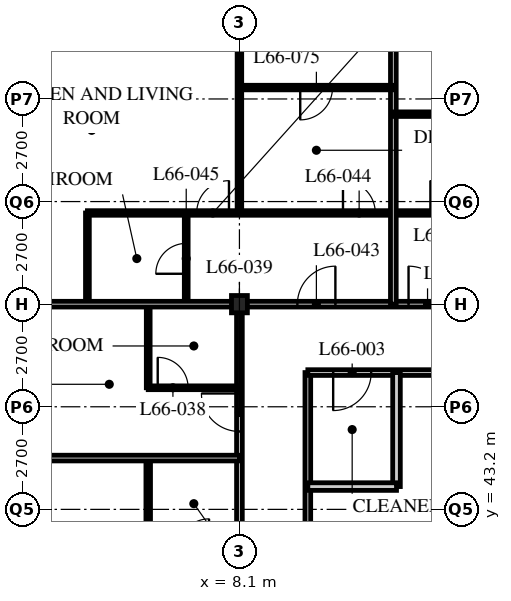
"""IFC4 building model, lengths in metres.
Left out: names, types, materials, properties, quantities, classifications, styles, units other than length and angle.
Written with IfcOpenShell. Run it as: python <this file> out.ifc"""

import sys

from ifc_helpers import new_model, si_unit, direction, frame, frame_2d, origin, origin_2d, place, context, subcontext, project, spatial, rectangle, i_section, extrude, element, fill, save


model = new_model("IFC4")
c1 = context("Model", 3, precision=1e-05, world=origin(), true_north=direction((0.0, 1.0)))
c2 = subcontext(c1, "Body", "Model", "MODEL_VIEW")
j1 = project(units=[si_unit("LENGTHUNIT", "METRE"), si_unit("PLANEANGLEUNIT", "RADIAN")], contexts=[c1])
p1 = place(None, origin())
s1 = spatial("IfcSite", under=j1, at=p1, CompositionType="ELEMENT")
p2 = place(p1, origin())
s2 = spatial("IfcBuilding", under=s1, at=p2, CompositionType="ELEMENT")
p3 = place(p2, frame((0.0, 0.0, 258.0)))
s3 = spatial("IfcBuildingStorey", under=s2, at=p3, CompositionType="ELEMENT", Elevation=258.0)
p4 = place(p3, frame((8.1, 48.6, 0.0), z_axis=(0.0, 0.0, 1.0), x_axis=(1.0, 0.0, 0.0)))
e1 = element("IfcColumn", 1, at=p4, inside=s3, PredefinedType="COLUMN", context=c2, shape_type="SweptSolid", body=[
    extrude(i_section(OverallWidth=0.418, OverallDepth=0.456, WebThickness=0.042, FlangeThickness=0.067, FilletRadius=0.015, at=origin_2d()), origin(), (0.0, 0.0, 1.0), 3.9),
])
p5 = place(p3, frame((8.1, 48.6, 0.0), z_axis=(0.0, 0.0, 1.0), x_axis=(1.0, 0.0, 0.0)))
e2 = element("IfcWall", 2, at=p5, inside=s3, PredefinedType="PARTITIONING", context=c2, shape_type="SweptSolid", body=[
    extrude(rectangle(XDim=28.35, YDim=0.15, at=frame_2d((14.175, 0.0))), origin(), (0.0, 0.0, 1.0), 3.078),
])
p6 = place(p5, frame((4.45, 0.0, 0.0)))
e3 = element("IfcOpeningElement", 3, at=p6, cuts=e2, PredefinedType="OPENING", context=c2, shape_type="SweptSolid", body=[
    extrude(rectangle(XDim=1.0, YDim=2.1, at=frame_2d((0.5, 1.05))), frame((0.0, 0.085, 0.0), z_axis=(0.0, -1.0, 0.0), x_axis=(1.0, 0.0, 0.0)), (0.0, 0.0, 1.0), 0.17),
])
p7 = place(p5, frame((20.65, 0.0, 0.0)))
e4 = element("IfcOpeningElement", 4, at=p7, cuts=e2, PredefinedType="OPENING", context=c2, shape_type="SweptSolid", body=[
    extrude(rectangle(XDim=1.0, YDim=2.1, at=frame_2d((0.5, 1.05))), frame((0.0, 0.085, 0.0), z_axis=(0.0, -1.0, 0.0), x_axis=(1.0, 0.0, 0.0)), (0.0, 0.0, 1.0), 0.17),
])
p8 = place(p5, frame((1.525, 0.0, 0.0)))
e5 = element("IfcOpeningElement", 5, at=p8, cuts=e2, PredefinedType="OPENING", context=c2, shape_type="SweptSolid", body=[
    extrude(rectangle(XDim=1.0, YDim=2.1, at=frame_2d((0.5, 1.05))), frame((0.0, 0.085, 0.0), z_axis=(0.0, -1.0, 0.0), x_axis=(1.0, 0.0, 0.0)), (0.0, 0.0, 1.0), 0.17),
])
p9 = place(p3, frame((8.1, 22.5, 0.0), z_axis=(0.0, 0.0, 1.0), x_axis=(0.0, 1.0, 0.0)))
e6 = element("IfcWall", 6, at=p9, inside=s3, PredefinedType="PARTITIONING", context=c2, shape_type="SweptSolid", body=[
    extrude(rectangle(XDim=26.1, YDim=0.15, at=frame_2d((13.05, 0.0))), origin(), (0.0, 0.0, 1.0), 3.078),
])
p10 = place(p9, frame((2.65, 0.0, 0.0)))
e7 = element("IfcOpeningElement", 7, at=p10, cuts=e6, PredefinedType="OPENING", context=c2, shape_type="SweptSolid", body=[
    extrude(rectangle(XDim=1.0, YDim=2.1, at=frame_2d((0.5, 1.05))), frame((0.0, 0.085, 0.0), z_axis=(0.0, -1.0, 0.0), x_axis=(1.0, 0.0, 0.0)), (0.0, 0.0, 1.0), 0.17),
])
p11 = place(p9, frame((22.75, 0.0, 0.0)))
e8 = element("IfcOpeningElement", 8, at=p11, cuts=e6, PredefinedType="OPENING", context=c2, shape_type="SweptSolid", body=[
    extrude(rectangle(XDim=1.0, YDim=2.1, at=frame_2d((0.5, 1.05))), frame((0.0, 0.085, 0.0), z_axis=(0.0, -1.0, 0.0), x_axis=(1.0, 0.0, 0.0)), (0.0, 0.0, 1.0), 0.17),
])
p12 = place(p3, frame((9.9, 24.3, 0.0), z_axis=(0.0, 0.0, 1.0), x_axis=(0.0, 1.0, 0.0)))
e9 = element("IfcWall", 9, at=p12, inside=s3, PredefinedType="PARTITIONING", context=c2, shape_type="SweptSolid", body=[
    extrude(rectangle(XDim=22.5, YDim=0.15, at=frame_2d((11.25, 0.0))), origin(), (0.0, 0.0, 1.0), 3.69),
])
p13 = place(p12, frame((3.55, 0.0, 0.0)))
e10 = element("IfcOpeningElement", 10, at=p13, cuts=e9, PredefinedType="OPENING", context=c2, shape_type="SweptSolid", body=[
    extrude(rectangle(XDim=1.0, YDim=2.1, at=frame_2d((0.5, 1.05))), frame((0.0, 0.085, 0.0), z_axis=(0.0, -1.0, 0.0), x_axis=(1.0, 0.0, 0.0)), (0.0, 0.0, 1.0), 0.17),
])
p14 = place(p12, frame((11.65, 0.0, 0.0)))
e11 = element("IfcOpeningElement", 11, at=p14, cuts=e9, PredefinedType="OPENING", context=c2, shape_type="SweptSolid", body=[
    extrude(rectangle(XDim=1.0, YDim=2.1, at=frame_2d((0.5, 1.05))), frame((0.0, 0.085, 0.0), z_axis=(0.0, -1.0, 0.0), x_axis=(1.0, 0.0, 0.0)), (0.0, 0.0, 1.0), 0.17),
])
p15 = place(p3, frame((9.9, 46.8, 0.0), z_axis=(0.0, 0.0, 1.0), x_axis=(1.0, 0.0, 0.0)))
e12 = element("IfcWall", 12, at=p15, inside=s3, PredefinedType="PARTITIONING", context=c2, shape_type="SweptSolid", body=[
    extrude(rectangle(XDim=17.24, YDim=0.15, at=frame_2d((8.62, 0.0))), origin(), (0.0, 0.0, 1.0), 3.69),
])
p16 = place(p15, frame((0.667, 0.0, 0.0)))
e13 = element("IfcOpeningElement", 13, at=p16, cuts=e12, PredefinedType="OPENING", context=c2, shape_type="SweptSolid", body=[
    extrude(rectangle(XDim=1.0, YDim=2.1, at=frame_2d((0.5, 1.05))), frame((0.0, 0.085, 0.0), z_axis=(0.0, -1.0, 0.0), x_axis=(1.0, 0.0, 0.0)), (0.0, 0.0, 1.0), 0.17),
])
p17 = place(p15, frame((3.817, 0.0, 0.0)))
e14 = element("IfcOpeningElement", 14, at=p17, cuts=e12, PredefinedType="OPENING", context=c2, shape_type="SweptSolid", body=[
    extrude(rectangle(XDim=1.0, YDim=2.1, at=frame_2d((0.5, 1.05))), frame((0.0, 0.085, 0.0), z_axis=(0.0, -1.0, 0.0), x_axis=(1.0, 0.0, 0.0)), (0.0, 0.0, 1.0), 0.17),
])
p18 = place(p15, frame((8.102, 0.0, 0.0)))
e15 = element("IfcOpeningElement", 15, at=p18, cuts=e12, PredefinedType="OPENING", context=c2, shape_type="SweptSolid", body=[
    extrude(rectangle(XDim=1.0, YDim=2.1, at=frame_2d((0.5, 1.05))), frame((0.0, 0.085, 0.0), z_axis=(0.0, -1.0, 0.0), x_axis=(1.0, 0.0, 0.0)), (0.0, 0.0, 1.0), 0.17),
])
p19 = place(p15, frame((13.577, 0.0, 0.0)))
e16 = element("IfcOpeningElement", 16, at=p19, cuts=e12, PredefinedType="OPENING", context=c2, shape_type="SweptSolid", body=[
    extrude(rectangle(XDim=1.0, YDim=2.1, at=frame_2d((0.5, 1.05))), frame((0.0, 0.085, 0.0), z_axis=(0.0, -1.0, 0.0), x_axis=(1.0, 0.0, 0.0)), (0.0, 0.0, 1.0), 0.17),
])
p20 = place(p3, frame((12.233, 46.8, 0.0), z_axis=(0.0, 0.0, 1.0), x_axis=(0.0, -1.0, 0.0)))
e17 = element("IfcWall", 17, at=p20, inside=s3, PredefinedType="SOLIDWALL", context=c2, shape_type="SweptSolid", body=[
    extrude(rectangle(XDim=3.0, YDim=0.2, at=frame_2d((1.5, 0.0))), origin(), (0.0, 0.0, 1.0), 3.69),
])
p21 = place(p3, frame((9.9, 43.8, 0.0), z_axis=(0.0, 0.0, 1.0), x_axis=(1.0, 0.0, 0.0)))
e18 = element("IfcWall", 18, at=p21, inside=s3, PredefinedType="SOLIDWALL", context=c2, shape_type="SweptSolid", body=[
    extrude(rectangle(XDim=2.333, YDim=0.2, at=frame_2d((1.167, 0.0))), origin(), (0.0, 0.0, 1.0), 3.69),
])
p22 = place(p3, frame((5.7, 22.5, 0.0), z_axis=(0.0, 0.0, 1.0), x_axis=(0.0, 1.0, 0.0)))
e19 = element("IfcWall", 19, at=p22, inside=s3, PredefinedType="PARTITIONING", context=c2, shape_type="SweptSolid", body=[
    extrude(rectangle(XDim=22.05, YDim=0.12, at=frame_2d((11.025, 0.0))), origin(), (0.0, 0.0, 1.0), 3.69),
])
p23 = place(p22, frame((0.975, 0.0, 0.0)))
e20 = element("IfcOpeningElement", 20, at=p23, cuts=e19, PredefinedType="OPENING", context=c2, shape_type="SweptSolid", body=[
    extrude(rectangle(XDim=0.85, YDim=2.1, at=frame_2d((0.425, 1.05))), frame((0.0, 0.07, 0.0), z_axis=(0.0, -1.0, 0.0), x_axis=(1.0, 0.0, 0.0)), (0.0, 0.0, 1.0), 0.14),
])
p24 = place(p22, frame((10.225, 0.0, 0.0)))
e21 = element("IfcOpeningElement", 21, at=p24, cuts=e19, PredefinedType="OPENING", context=c2, shape_type="SweptSolid", body=[
    extrude(rectangle(XDim=0.85, YDim=2.1, at=frame_2d((0.425, 1.05))), frame((0.0, 0.07, 0.0), z_axis=(0.0, -1.0, 0.0), x_axis=(1.0, 0.0, 0.0)), (0.0, 0.0, 1.0), 0.14),
])
p25 = place(p22, frame((14.275, 0.0, 0.0)))
e22 = element("IfcOpeningElement", 22, at=p25, cuts=e19, PredefinedType="OPENING", context=c2, shape_type="SweptSolid", body=[
    extrude(rectangle(XDim=0.85, YDim=2.1, at=frame_2d((0.425, 1.05))), frame((0.0, 0.07, 0.0), z_axis=(0.0, -1.0, 0.0), x_axis=(1.0, 0.0, 0.0)), (0.0, 0.0, 1.0), 0.14),
])
p26 = place(p22, frame((18.325, 0.0, 0.0)))
e23 = element("IfcOpeningElement", 23, at=p26, cuts=e19, PredefinedType="OPENING", context=c2, shape_type="SweptSolid", body=[
    extrude(rectangle(XDim=0.85, YDim=2.1, at=frame_2d((0.425, 1.05))), frame((0.0, 0.07, 0.0), z_axis=(0.0, -1.0, 0.0), x_axis=(1.0, 0.0, 0.0)), (0.0, 0.0, 1.0), 0.14),
])
p27 = place(p3, frame((8.1, 44.55, 0.0), z_axis=(0.0, 0.0, 1.0), x_axis=(-1.0, 0.0, 0.0)))
e24 = element("IfcWall", 24, at=p27, inside=s3, PredefinedType="PARTITIONING", context=c2, shape_type="SweptSolid", body=[
    extrude(rectangle(XDim=7.8, YDim=0.15, at=frame_2d((3.9, 0.0))), origin(), (0.0, 0.0, 1.0), 3.69),
])
p28 = place(p3, frame((5.7, 46.4, 0.0), z_axis=(0.0, 0.0, 1.0), x_axis=(0.0, 1.0, 0.0)))
e25 = element("IfcWall", 25, at=p28, inside=s3, PredefinedType="PARTITIONING", context=c2, shape_type="SweptSolid", body=[
    extrude(rectangle(XDim=2.2, YDim=0.1, at=frame_2d((1.1, 0.0))), origin(), (0.0, 0.0, 1.0), 3.69),
])
p29 = place(p3, frame((8.1, 46.4, 0.0), z_axis=(0.0, 0.0, 1.0), x_axis=(-1.0, 0.0, 0.0)))
e26 = element("IfcWall", 26, at=p29, inside=s3, PredefinedType="PARTITIONING", context=c2, shape_type="SweptSolid", body=[
    extrude(rectangle(XDim=2.4, YDim=0.1, at=frame_2d((1.2, 0.0))), origin(), (0.0, 0.0, 1.0), 3.69),
])
p30 = place(p29, frame((1.35, 0.0, 0.0)))
e27 = element("IfcOpeningElement", 27, at=p30, cuts=e26, PredefinedType="OPENING", context=c2, shape_type="SweptSolid", body=[
    extrude(rectangle(XDim=0.8, YDim=2.1, at=frame_2d((0.4, 1.05))), frame((0.0, 0.06, 0.0), z_axis=(0.0, -1.0, 0.0), x_axis=(1.0, 0.0, 0.0)), (0.0, 0.0, 1.0), 0.12),
])
p31 = place(p3, frame((6.7, 48.6, 0.0), z_axis=(0.0, 0.0, 1.0), x_axis=(0.0, 1.0, 0.0)))
e28 = element("IfcWall", 28, at=p31, inside=s3, PredefinedType="PARTITIONING", context=c2, shape_type="SweptSolid", body=[
    extrude(rectangle(XDim=2.4, YDim=0.1, at=frame_2d((1.2, 0.0))), origin(), (0.0, 0.0, 1.0), 3.69),
])
p32 = place(p31, frame((0.8, 0.0, 0.0)))
e29 = element("IfcOpeningElement", 29, at=p32, cuts=e28, PredefinedType="OPENING", context=c2, shape_type="SweptSolid", body=[
    extrude(rectangle(XDim=0.8, YDim=2.1, at=frame_2d((0.4, 1.05))), frame((0.0, 0.06, 0.0), z_axis=(0.0, -1.0, 0.0), x_axis=(1.0, 0.0, 0.0)), (0.0, 0.0, 1.0), 0.12),
])
p33 = place(p3, frame((4.1, 48.6, 0.0), z_axis=(0.0, 0.0, 1.0), x_axis=(0.0, 1.0, 0.0)))
e30 = element("IfcWall", 30, at=p33, inside=s3, PredefinedType="PARTITIONING", context=c2, shape_type="SweptSolid", body=[
    extrude(rectangle(XDim=2.4, YDim=0.1, at=frame_2d((1.2, 0.0))), origin(), (0.0, 0.0, 1.0), 3.69),
])
p34 = place(p3, frame((4.1, 51.0, 0.0), z_axis=(0.0, 0.0, 1.0), x_axis=(1.0, 0.0, 0.0)))
e31 = element("IfcWall", 31, at=p34, inside=s3, PredefinedType="PARTITIONING", context=c2, shape_type="SweptSolid", body=[
    extrude(rectangle(XDim=32.35, YDim=0.12, at=frame_2d((16.175, 0.0))), origin(), (0.0, 0.0, 1.0), 3.69),
])
p35 = place(p34, frame((9.025, 0.0, 0.0)))
e32 = element("IfcOpeningElement", 32, at=p35, cuts=e31, PredefinedType="OPENING", context=c2, shape_type="SweptSolid", body=[
    extrude(rectangle(XDim=0.85, YDim=2.1, at=frame_2d((0.425, 1.05))), frame((0.0, 0.07, 0.0), z_axis=(0.0, -1.0, 0.0), x_axis=(1.0, 0.0, 0.0)), (0.0, 0.0, 1.0), 0.14),
])
p36 = place(p34, frame((16.475, 0.0, 0.0)))
e33 = element("IfcOpeningElement", 33, at=p36, cuts=e31, PredefinedType="OPENING", context=c2, shape_type="SweptSolid", body=[
    extrude(rectangle(XDim=0.85, YDim=2.1, at=frame_2d((0.425, 1.05))), frame((0.0, 0.07, 0.0), z_axis=(0.0, -1.0, 0.0), x_axis=(1.0, 0.0, 0.0)), (0.0, 0.0, 1.0), 0.14),
])
p37 = place(p34, frame((20.525, 0.0, 0.0)))
e34 = element("IfcOpeningElement", 34, at=p37, cuts=e31, PredefinedType="OPENING", context=c2, shape_type="SweptSolid", body=[
    extrude(rectangle(XDim=0.85, YDim=2.1, at=frame_2d((0.425, 1.05))), frame((0.0, 0.07, 0.0), z_axis=(0.0, -1.0, 0.0), x_axis=(1.0, 0.0, 0.0)), (0.0, 0.0, 1.0), 0.14),
])
p38 = place(p34, frame((25.225, 0.0, 0.0)))
e35 = element("IfcOpeningElement", 35, at=p38, cuts=e31, PredefinedType="OPENING", context=c2, shape_type="SweptSolid", body=[
    extrude(rectangle(XDim=0.85, YDim=2.1, at=frame_2d((0.425, 1.05))), frame((0.0, 0.07, 0.0), z_axis=(0.0, -1.0, 0.0), x_axis=(1.0, 0.0, 0.0)), (0.0, 0.0, 1.0), 0.14),
])
p39 = place(p34, frame((28.625, 0.0, 0.0)))
e36 = element("IfcOpeningElement", 36, at=p39, cuts=e31, PredefinedType="OPENING", context=c2, shape_type="SweptSolid", body=[
    extrude(rectangle(XDim=0.85, YDim=2.1, at=frame_2d((0.425, 1.05))), frame((0.0, 0.07, 0.0), z_axis=(0.0, -1.0, 0.0), x_axis=(1.0, 0.0, 0.0)), (0.0, 0.0, 1.0), 0.14),
])
p40 = place(p34, frame((6.725, 0.0, 0.0)))
e37 = element("IfcOpeningElement", 37, at=p40, cuts=e31, PredefinedType="OPENING", context=c2, shape_type="SweptSolid", body=[
    extrude(rectangle(XDim=0.85, YDim=2.1, at=frame_2d((0.425, 1.05))), frame((0.0, 0.07, 0.0), z_axis=(0.0, -1.0, 0.0), x_axis=(1.0, 0.0, 0.0)), (0.0, 0.0, 1.0), 0.14),
])
p41 = place(p34, frame((2.875, 0.0, 0.0)))
e38 = element("IfcOpeningElement", 38, at=p41, cuts=e31, PredefinedType="OPENING", context=c2, shape_type="SweptSolid", body=[
    extrude(rectangle(XDim=0.85, YDim=2.1, at=frame_2d((0.425, 1.05))), frame((0.0, 0.07, 0.0), z_axis=(0.0, -1.0, 0.0), x_axis=(1.0, 0.0, 0.0)), (0.0, 0.0, 1.0), 0.14),
])
p42 = place(p3, frame((8.1, 51.0, 0.0), z_axis=(0.0, 0.0, 1.0), x_axis=(0.0, 1.0, 0.0)))
e39 = element("IfcWall", 39, at=p42, inside=s3, PredefinedType="PARTITIONING", context=c2, shape_type="SweptSolid", body=[
    extrude(rectangle(XDim=9.45, YDim=0.12, at=frame_2d((4.725, 0.0))), origin(), (0.0, 0.0, 1.0), 3.078),
])
p43 = place(p3, frame((0.3, 48.6, 0.0), z_axis=(0.0, 0.0, 1.0), x_axis=(1.0, 0.0, 0.0)))
e40 = element("IfcWall", 40, at=p43, inside=s3, PredefinedType="PARTITIONING", context=c2, shape_type="SweptSolid", body=[
    extrude(rectangle(XDim=7.8, YDim=0.15, at=frame_2d((3.9, 0.0))), origin(), (0.0, 0.0, 1.0), 3.078),
])
p44 = place(p3, frame((12.15, 48.6, 0.0), z_axis=(0.0, 0.0, 1.0), x_axis=(0.0, 1.0, 0.0)))
e41 = element("IfcWall", 41, at=p44, inside=s3, PredefinedType="PARTITIONING", context=c2, shape_type="SweptSolid", body=[
    extrude(rectangle(XDim=15.9, YDim=0.15, at=frame_2d((7.95, 0.0))), origin(), (0.0, 0.0, 1.0), 3.69),
])
p45 = place(p3, frame((12.15, 53.6, 0.0), z_axis=(0.0, 0.0, 1.0), x_axis=(1.0, 0.0, 0.0)))
e42 = element("IfcWall", 42, at=p45, inside=s3, PredefinedType="PARTITIONING", context=c2, shape_type="SweptSolid", body=[
    extrude(rectangle(XDim=8.1, YDim=0.12, at=frame_2d((4.05, 0.0))), origin(), (0.0, 0.0, 1.0), 3.69),
])
p46 = place(p45, frame((1.675, 0.0, 0.0)))
e43 = element("IfcOpeningElement", 43, at=p46, cuts=e42, PredefinedType="OPENING", context=c2, shape_type="SweptSolid", body=[
    extrude(rectangle(XDim=0.85, YDim=2.1, at=frame_2d((0.425, 1.05))), frame((0.0, 0.07, 0.0), z_axis=(0.0, -1.0, 0.0), x_axis=(1.0, 0.0, 0.0)), (0.0, 0.0, 1.0), 0.14),
])
p47 = place(p3, frame((8.1, 54.3, 0.0), z_axis=(0.0, 0.0, 1.0), x_axis=(1.0, 0.0, 0.0)))
e44 = element("IfcWall", 44, at=p47, inside=s3, PredefinedType="PARTITIONING", context=c2, shape_type="SweptSolid", body=[
    extrude(rectangle(XDim=4.05, YDim=0.12, at=frame_2d((2.025, 0.0))), origin(), (0.0, 0.0, 1.0), 3.69),
])
p48 = place(p47, frame((1.6, 0.0, 0.0)))
e45 = element("IfcOpeningElement", 45, at=p48, cuts=e44, PredefinedType="OPENING", context=c2, shape_type="SweptSolid", body=[
    extrude(rectangle(XDim=0.85, YDim=2.1, at=frame_2d((0.425, 1.05))), frame((0.0, 0.07, 0.0), z_axis=(0.0, -1.0, 0.0), x_axis=(1.0, 0.0, 0.0)), (0.0, 0.0, 1.0), 0.14),
])
p49 = place(p16, origin())
e46 = element("IfcDoor", 46, at=p49, inside=s3, OperationType="SINGLE_SWING_RIGHT", PredefinedType="DOOR", context=c2, shape_type="SweptSolid", body=[
    extrude(rectangle(XDim=1.0, YDim=2.1, at=frame_2d((0.5, 1.05))), frame((0.0, 0.025, 0.0), z_axis=(0.0, -1.0, 0.0), x_axis=(1.0, 0.0, 0.0)), (0.0, 0.0, 1.0), 0.05),
])
fill(e13, e46)
p50 = place(p6, origin())
e47 = element("IfcDoor", 47, at=p50, inside=s3, OperationType="SINGLE_SWING_LEFT", PredefinedType="DOOR", context=c2, shape_type="SweptSolid", body=[
    extrude(rectangle(XDim=1.0, YDim=2.1, at=frame_2d((0.5, 1.05))), frame((0.0, 0.025, 0.0), z_axis=(0.0, -1.0, 0.0), x_axis=(1.0, 0.0, 0.0)), (0.0, 0.0, 1.0), 0.05),
])
fill(e3, e47)
p51 = place(p35, origin())
e48 = element("IfcDoor", 48, at=p51, inside=s3, OperationType="SINGLE_SWING_LEFT", PredefinedType="DOOR", context=c2, shape_type="SweptSolid", body=[
    extrude(rectangle(XDim=0.85, YDim=2.1, at=frame_2d((0.425, 1.05))), frame((0.0, 0.025, 0.0), z_axis=(0.0, -1.0, 0.0), x_axis=(1.0, 0.0, 0.0)), (0.0, 0.0, 1.0), 0.05),
])
fill(e32, e48)
p52 = place(p30, origin())
e49 = element("IfcDoor", 49, at=p52, inside=s3, OperationType="SINGLE_SWING_LEFT", PredefinedType="DOOR", context=c2, shape_type="SweptSolid", body=[
    extrude(rectangle(XDim=0.8, YDim=2.1, at=frame_2d((0.4, 1.05))), frame((0.0, 0.025, 0.0), z_axis=(0.0, -1.0, 0.0), x_axis=(1.0, 0.0, 0.0)), (0.0, 0.0, 1.0), 0.05),
])
fill(e27, e49)
p53 = place(p11, origin())
e50 = element("IfcDoor", 50, at=p53, inside=s3, OperationType="SINGLE_SWING_RIGHT", PredefinedType="DOOR", context=c2, shape_type="SweptSolid", body=[
    extrude(rectangle(XDim=1.0, YDim=2.1, at=frame_2d((0.5, 1.05))), frame((0.0, 0.025, 0.0), z_axis=(0.0, -1.0, 0.0), x_axis=(1.0, 0.0, 0.0)), (0.0, 0.0, 1.0), 0.05),
])
fill(e8, e50)
p54 = place(p8, origin())
e51 = element("IfcDoor", 51, at=p54, inside=s3, OperationType="SINGLE_SWING_RIGHT", PredefinedType="DOOR", context=c2, shape_type="SweptSolid", body=[
    extrude(rectangle(XDim=1.0, YDim=2.1, at=frame_2d((0.5, 1.05))), frame((0.0, 0.025, 0.0), z_axis=(0.0, -1.0, 0.0), x_axis=(1.0, 0.0, 0.0)), (0.0, 0.0, 1.0), 0.05),
])
fill(e5, e51)
p55 = place(p40, origin())
e52 = element("IfcDoor", 52, at=p55, inside=s3, OperationType="SINGLE_SWING_LEFT", PredefinedType="DOOR", context=c2, shape_type="SweptSolid", body=[
    extrude(rectangle(XDim=0.85, YDim=2.1, at=frame_2d((0.425, 1.05))), frame((0.0, 0.025, 0.0), z_axis=(0.0, -1.0, 0.0), x_axis=(1.0, 0.0, 0.0)), (0.0, 0.0, 1.0), 0.05),
])
fill(e37, e52)
p56 = place(p32, origin())
e53 = element("IfcDoor", 53, at=p56, inside=s3, OperationType="SINGLE_SWING_LEFT", PredefinedType="DOOR", context=c2, shape_type="SweptSolid", body=[
    extrude(rectangle(XDim=0.8, YDim=2.1, at=frame_2d((0.4, 1.05))), frame((0.0, 0.025, 0.0), z_axis=(0.0, -1.0, 0.0), x_axis=(1.0, 0.0, 0.0)), (0.0, 0.0, 1.0), 0.05),
])
fill(e29, e53)
p57 = place(p41, origin())
e54 = element("IfcDoor", 54, at=p57, inside=s3, OperationType="SINGLE_SWING_RIGHT", PredefinedType="DOOR", context=c2, shape_type="SweptSolid", body=[
    extrude(rectangle(XDim=0.85, YDim=2.1, at=frame_2d((0.425, 1.05))), frame((0.0, 0.025, 0.0), z_axis=(0.0, -1.0, 0.0), x_axis=(1.0, 0.0, 0.0)), (0.0, 0.0, 1.0), 0.05),
])
fill(e38, e54)
p58 = place(p48, origin())
e55 = element("IfcDoor", 55, at=p58, inside=s3, OperationType="SINGLE_SWING_RIGHT", PredefinedType="DOOR", context=c2, shape_type="SweptSolid", body=[
    extrude(rectangle(XDim=0.85, YDim=2.1, at=frame_2d((0.425, 1.05))), frame((0.0, 0.025, 0.0), z_axis=(0.0, -1.0, 0.0), x_axis=(1.0, 0.0, 0.0)), (0.0, 0.0, 1.0), 0.05),
])
fill(e45, e55)
save(model, sys.argv[1])
